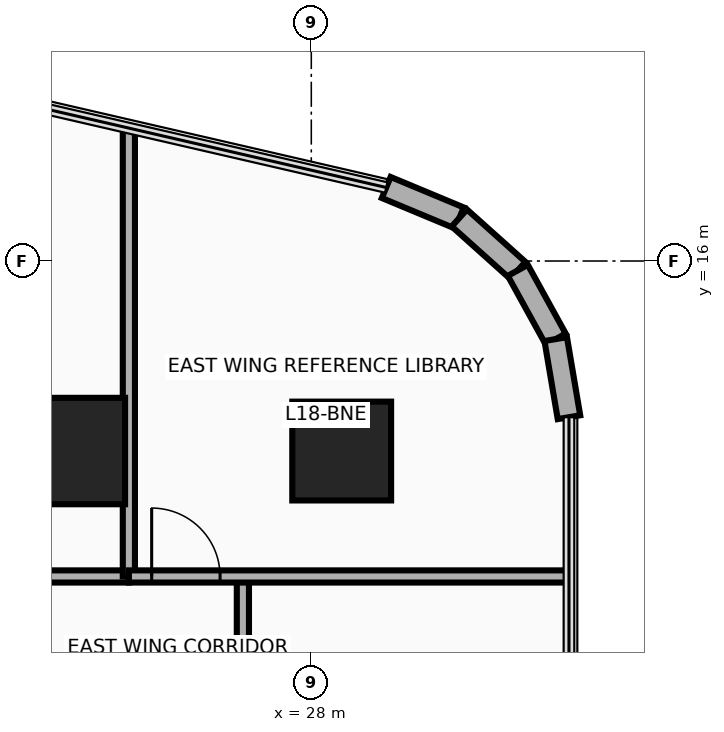
"""IFC4 building model, lengths in metres.
Left out: names, types, materials, properties, quantities, classifications, styles, units other than length and angle.
Written with IfcOpenShell. Run it as: python <this file> out.ifc"""

import sys

from ifc_helpers import new_model, si_unit, direction, frame, frame_2d, origin, origin_2d, place, context, subcontext, project, spatial, rectangle, circle, extrude, source, transform, mapped, element, fill, save


model = new_model("IFC4")
c1 = context("Model", 3, precision=1e-05, world=origin(), true_north=direction((0.0, 1.0)))
c2 = subcontext(c1, "Body", "Model", "MODEL_VIEW")
j1 = project(units=[si_unit("LENGTHUNIT", "METRE"), si_unit("PLANEANGLEUNIT", "RADIAN")], contexts=[c1])
p1 = place(None, origin())
s1 = spatial("IfcSite", under=j1, at=p1, CompositionType="ELEMENT")
p2 = place(p1, origin())
s2 = spatial("IfcBuilding", under=s1, at=p2, CompositionType="ELEMENT")
p3 = place(p2, frame((0.0, 0.0, 74.1)))
s3 = spatial("IfcBuildingStorey", under=s2, at=p3, CompositionType="ELEMENT", Elevation=74.1)
m1 = source(origin(), c2, "Body", "SweptSolid", [
    extrude(rectangle(XDim=1.4, YDim=1.4, at=origin_2d()), origin(), (0.0, 0.0, 1.0), 3.7),
])
p4 = place(p3, frame((24.85, 13.5, 0.0), z_axis=(0.0, 0.0, 1.0), x_axis=(1.0, 0.0, 0.0)))
e1 = element("IfcColumn", 1, at=p4, inside=s3, PredefinedType="COLUMN", context=c2, shape_type="MappedRepresentation", body=[
    mapped(m1, transform((0.0, 0.0, 0.0), x_axis=(1.0, 0.0, 0.0), y_axis=(0.0, 1.0, 0.0), z_axis=(0.0, 0.0, 1.0), scale=1.0)),
])
m2 = source(origin(), c2, "Body", "SweptSolid", [
    extrude(circle(Radius=0.65, at=origin_2d()), origin(), (0.0, 0.0, 1.0), 3.7),
])
p5 = place(p3, frame((28.4, 13.5, 0.0), z_axis=(0.0, 0.0, 1.0), x_axis=(1.0, 0.0, 0.0)))
e2 = element("IfcColumn", 2, at=p5, inside=s3, PredefinedType="COLUMN", context=c2, shape_type="MappedRepresentation", body=[
    mapped(m2, transform((0.0, 0.0, 0.0), x_axis=(1.0, 0.0, 0.0), y_axis=(0.0, 1.0, 0.0), z_axis=(0.0, 0.0, 1.0), scale=1.0)),
])
p6 = place(p3, frame((28.986, 16.967, 0.0), z_axis=(0.0, 0.0, 1.0), x_axis=(0.923083852684, -0.384598753136, 0.0)))
e3 = element("IfcWall", 3, at=p6, inside=s3, PredefinedType="SOLIDWALL", context=c2, shape_type="SweptSolid", body=[
    extrude(rectangle(XDim=1.042, YDim=0.3, at=frame_2d((0.521, 0.0))), origin(), (0.0, 0.0, 1.0), 3.46),
])
p7 = place(p3, frame((29.948, 16.566, 0.0), z_axis=(0.0, 0.0, 1.0), x_axis=(0.744585645533, -0.66752694063, 0.0)))
e4 = element("IfcWall", 4, at=p7, inside=s3, PredefinedType="SOLIDWALL", context=c2, shape_type="SweptSolid", body=[
    extrude(rectangle(XDim=1.033, YDim=0.3, at=frame_2d((0.517, 0.0))), origin(), (0.0, 0.0, 1.0), 3.46),
])
p8 = place(p3, frame((30.717, 15.877, 0.0), z_axis=(0.0, 0.0, 1.0), x_axis=(0.482971098131, -0.875636293429, 0.0)))
e5 = element("IfcWall", 5, at=p8, inside=s3, PredefinedType="SOLIDWALL", context=c2, shape_type="SweptSolid", body=[
    extrude(rectangle(XDim=1.033, YDim=0.3, at=frame_2d((0.516, 0.0))), origin(), (0.0, 0.0, 1.0), 3.46),
])
p9 = place(p3, frame((31.216, 14.973, 0.0), z_axis=(0.0, 0.0, 1.0), x_axis=(0.167019462117, -0.985953598946, 0.0)))
e6 = element("IfcWall", 6, at=p9, inside=s3, PredefinedType="SOLIDWALL", context=c2, shape_type="SweptSolid", body=[
    extrude(rectangle(XDim=1.042, YDim=0.3, at=frame_2d((0.521, 0.0))), origin(), (0.0, 0.0, 1.0), 3.46),
])
p10 = place(p3, frame((15.4, 11.85, 0.0), z_axis=(0.0, 0.0, 1.0), x_axis=(1.0, 0.0, 0.0)))
e7 = element("IfcWall", 7, at=p10, inside=s3, PredefinedType="PARTITIONING", context=c2, shape_type="SweptSolid", body=[
    extrude(rectangle(XDim=10.2, YDim=0.16, at=frame_2d((5.1, 0.0))), origin(), (0.0, 0.0, 1.0), 2.834),
])
p11 = place(p10, frame((4.65, 0.0, 0.0)))
e8 = element("IfcOpeningElement", 8, at=p11, cuts=e7, PredefinedType="OPENING", context=c2, shape_type="SweptSolid", body=[
    extrude(rectangle(XDim=0.9, YDim=2.1, at=frame_2d((0.45, 1.05))), frame((0.0, 0.095, 0.0), z_axis=(0.0, -1.0, 0.0), x_axis=(1.0, 0.0, 0.0)), (0.0, 0.0, 1.0), 0.19),
])
p12 = place(p3, frame((25.6, 11.85, 0.0), z_axis=(0.0, 0.0, 1.0), x_axis=(0.0, 1.0, 0.0)))
e9 = element("IfcWall", 9, at=p12, inside=s3, PredefinedType="PARTITIONING", context=c2, shape_type="SweptSolid", body=[
    extrude(rectangle(XDim=5.898, YDim=0.16, at=frame_2d((2.949, 0.0))), origin(), (0.0, 0.0, 1.0), 2.583),
])
p13 = place(p3, frame((27.1, -13.89, 0.0), z_axis=(0.0, 0.0, 1.0), x_axis=(0.0, 1.0, 0.0)))
e10 = element("IfcWall", 10, at=p13, inside=s3, PredefinedType="PARTITIONING", context=c2, shape_type="SweptSolid", body=[
    extrude(rectangle(XDim=25.74, YDim=0.16, at=frame_2d((12.87, 0.0))), origin(), (0.0, 0.0, 1.0), 2.583),
])
p14 = place(p13, frame((2.62, 0.0, 0.0)))
e11 = element("IfcOpeningElement", 11, at=p14, cuts=e10, PredefinedType="OPENING", context=c2, shape_type="SweptSolid", body=[
    extrude(rectangle(XDim=0.95, YDim=2.15, at=frame_2d((0.475, 1.075))), frame((0.0, 0.095, 0.0), z_axis=(0.0, -1.0, 0.0), x_axis=(1.0, 0.0, 0.0)), (0.0, 0.0, 1.0), 0.19),
])
p15 = place(p13, frame((8.484, 0.0, 0.0)))
e12 = element("IfcOpeningElement", 12, at=p15, cuts=e10, PredefinedType="OPENING", context=c2, shape_type="SweptSolid", body=[
    extrude(rectangle(XDim=0.95, YDim=2.15, at=frame_2d((0.475, 1.075))), frame((0.0, 0.095, 0.0), z_axis=(0.0, -1.0, 0.0), x_axis=(1.0, 0.0, 0.0)), (0.0, 0.0, 1.0), 0.19),
])
p16 = place(p13, frame((14.197, 0.0, 0.0)))
e13 = element("IfcOpeningElement", 13, at=p16, cuts=e10, PredefinedType="OPENING", context=c2, shape_type="SweptSolid", body=[
    extrude(rectangle(XDim=0.95, YDim=2.15, at=frame_2d((0.475, 1.075))), frame((0.0, 0.095, 0.0), z_axis=(0.0, -1.0, 0.0), x_axis=(1.0, 0.0, 0.0)), (0.0, 0.0, 1.0), 0.19),
])
p17 = place(p13, frame((21.648, 0.0, 0.0)))
e14 = element("IfcOpeningElement", 14, at=p17, cuts=e10, PredefinedType="OPENING", context=c2, shape_type="SweptSolid", body=[
    extrude(rectangle(XDim=0.95, YDim=2.15, at=frame_2d((0.475, 1.075))), frame((0.0, 0.095, 0.0), z_axis=(0.0, -1.0, 0.0), x_axis=(1.0, 0.0, 0.0)), (0.0, 0.0, 1.0), 0.19),
])
p18 = place(p3, frame((25.6, 11.85, 0.0), z_axis=(0.0, 0.0, 1.0), x_axis=(1.0, 0.0, 0.0)))
e15 = element("IfcWall", 15, at=p18, inside=s3, PredefinedType="PARTITIONING", context=c2, shape_type="SweptSolid", body=[
    extrude(rectangle(XDim=5.79, YDim=0.16, at=frame_2d((2.895, 0.0))), origin(), (0.0, 0.0, 1.0), 2.896),
])
p19 = place(p18, frame((0.3, 0.0, 0.0)))
e16 = element("IfcOpeningElement", 16, at=p19, cuts=e15, PredefinedType="OPENING", context=c2, shape_type="SweptSolid", body=[
    extrude(rectangle(XDim=0.9, YDim=2.1, at=frame_2d((0.45, 1.05))), frame((0.0, 0.095, 0.0), z_axis=(0.0, -1.0, 0.0), x_axis=(1.0, 0.0, 0.0)), (0.0, 0.0, 1.0), 0.19),
])
p20 = place(p19, origin())
e17 = element("IfcDoor", 17, at=p20, inside=s3, OperationType="SINGLE_SWING_LEFT", PredefinedType="DOOR", context=c2, shape_type="SweptSolid", body=[
    extrude(rectangle(XDim=0.9, YDim=2.1, at=frame_2d((0.45, 1.05))), frame((0.0, 0.025, 0.0), z_axis=(0.0, -1.0, 0.0), x_axis=(1.0, 0.0, 0.0)), (0.0, 0.0, 1.0), 0.05),
])
fill(e16, e17)
save(model, sys.argv[1])
